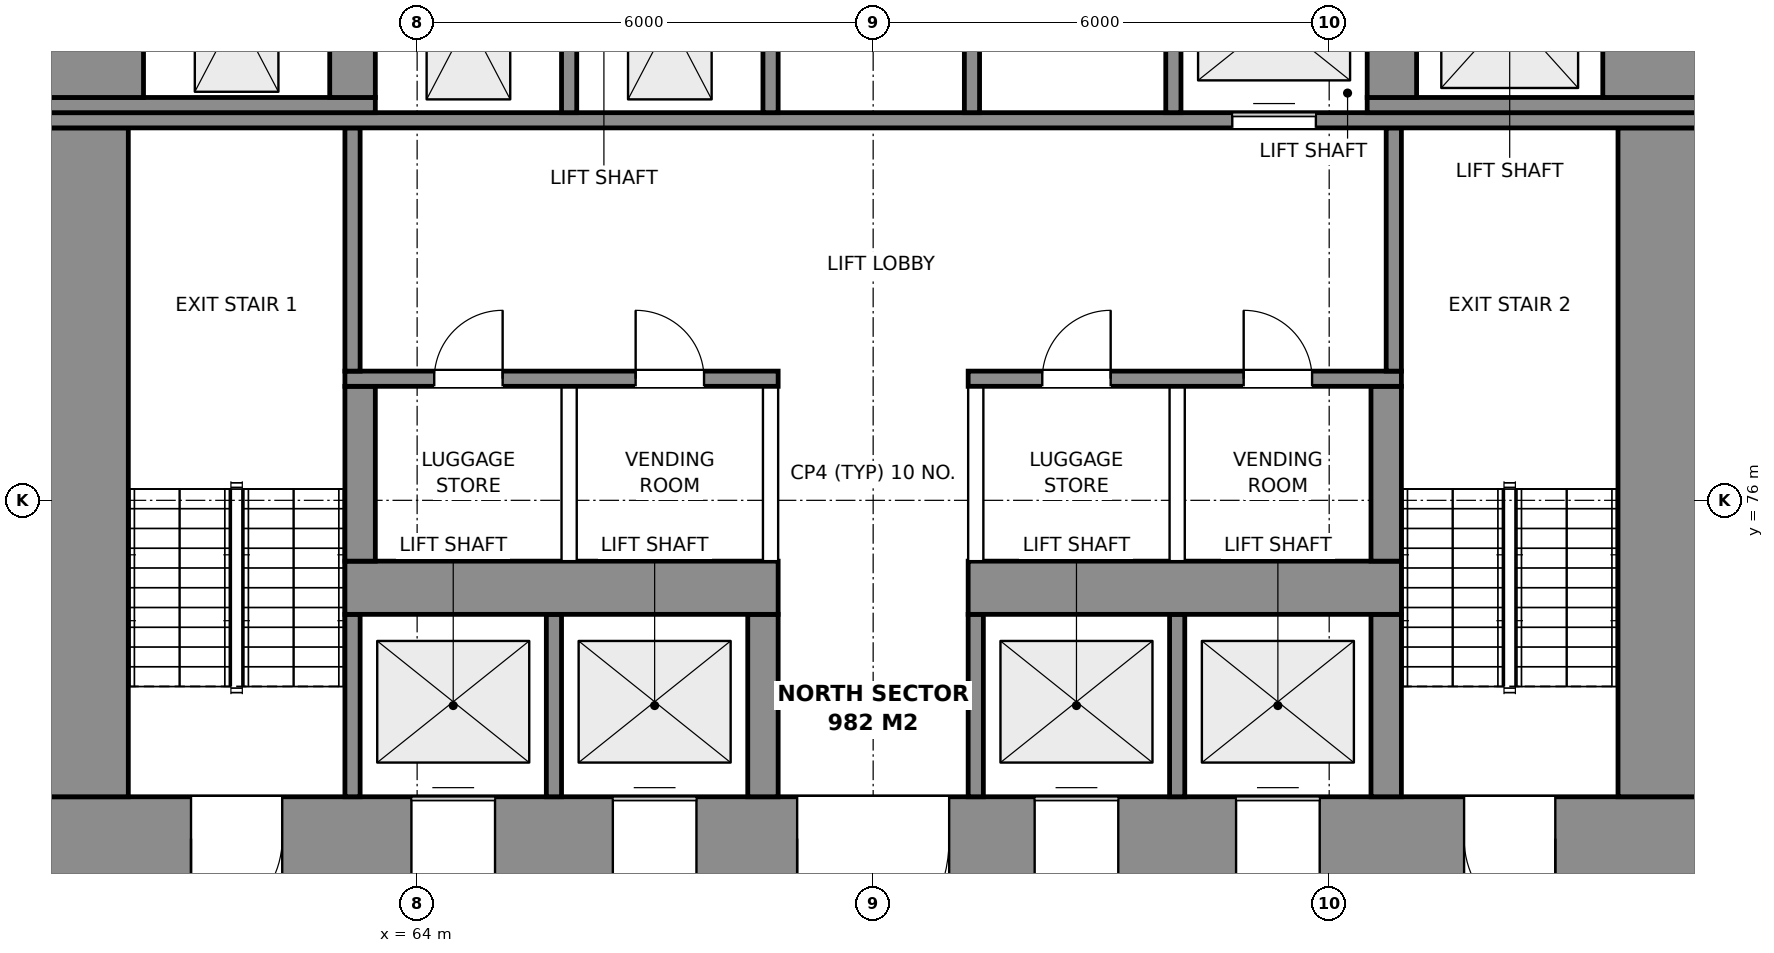
"""IFC4 building model, lengths in metres.
Left out: names, types, materials, properties, quantities, classifications, styles, units other than length and angle.
Written with IfcOpenShell. Run it as: python <this file> out.ifc"""

import sys

from ifc_helpers import new_model, si_unit, direction, frame, frame_2d, origin, place, context, subcontext, project, spatial, rectangle, extrude, element, fill, save


model = new_model("IFC4")
c1 = context("Model", 3, precision=1e-05, world=origin(), true_north=direction((0.0, 1.0)))
c2 = subcontext(c1, "Body", "Model", "MODEL_VIEW")
j1 = project(units=[si_unit("LENGTHUNIT", "METRE"), si_unit("PLANEANGLEUNIT", "RADIAN")], contexts=[c1])
p1 = place(None, origin())
s1 = spatial("IfcSite", under=j1, at=p1, CompositionType="ELEMENT")
p2 = place(p1, origin())
s2 = spatial("IfcBuilding", under=s1, at=p2, CompositionType="ELEMENT")
p3 = place(p2, frame((0.0, 0.0, 98.6)))
s3 = spatial("IfcBuildingStorey", under=s2, at=p3, CompositionType="ELEMENT", Elevation=98.6)
p4 = place(p3, frame((59.0, 71.55, 0.0), z_axis=(0.0, 0.0, 1.0), x_axis=(1.0, 0.0, 0.0)))
e1 = element("IfcWall", 1, at=p4, inside=s3, PredefinedType="SHEAR", context=c2, shape_type="SweptSolid", body=[
    extrude(rectangle(XDim=22.0, YDim=1.1, at=frame_2d((11.0, 0.0))), origin(), (0.0, 0.0, 1.0), 3.9),
])
p5 = place(p4, frame((2.025, 0.0, 0.0)))
e2 = element("IfcOpeningElement", 2, at=p5, cuts=e1, PredefinedType="OPENING", context=c2, shape_type="SweptSolid", body=[
    extrude(rectangle(XDim=1.2, YDim=2.1, at=frame_2d((0.6, 1.05))), frame((0.0, 0.56, 0.0), z_axis=(0.0, -1.0, 0.0), x_axis=(1.0, 0.0, 0.0)), (0.0, 0.0, 1.0), 1.12),
])
p6 = place(p4, frame((18.775, 0.0, 0.0)))
e3 = element("IfcOpeningElement", 3, at=p6, cuts=e1, PredefinedType="OPENING", context=c2, shape_type="SweptSolid", body=[
    extrude(rectangle(XDim=1.2, YDim=2.1, at=frame_2d((0.6, 1.05))), frame((0.0, 0.56, 0.0), z_axis=(0.0, -1.0, 0.0), x_axis=(1.0, 0.0, 0.0)), (0.0, 0.0, 1.0), 1.12),
])
p7 = place(p4, frame((10.0, 0.0, 0.0)))
e4 = element("IfcOpeningElement", 4, at=p7, cuts=e1, PredefinedType="OPENING", context=c2, shape_type="SweptSolid", body=[
    extrude(rectangle(XDim=2.0, YDim=2.1, at=frame_2d((1.0, 1.05))), frame((0.0, 0.56, 0.0), z_axis=(0.0, -1.0, 0.0), x_axis=(1.0, 0.0, 0.0)), (0.0, 0.0, 1.0), 1.12),
])
p8 = place(p4, frame((4.925, 0.0, 0.0)))
e5 = element("IfcOpeningElement", 5, at=p8, cuts=e1, PredefinedType="OPENING", context=c2, shape_type="SweptSolid", body=[
    extrude(rectangle(XDim=1.1, YDim=2.1, at=frame_2d((0.55, 1.05))), frame((0.0, 0.56, 0.0), z_axis=(0.0, -1.0, 0.0), x_axis=(1.0, 0.0, 0.0)), (0.0, 0.0, 1.0), 1.12),
])
p9 = place(p4, frame((7.575, 0.0, 0.0)))
e6 = element("IfcOpeningElement", 6, at=p9, cuts=e1, PredefinedType="OPENING", context=c2, shape_type="SweptSolid", body=[
    extrude(rectangle(XDim=1.1, YDim=2.1, at=frame_2d((0.55, 1.05))), frame((0.0, 0.56, 0.0), z_axis=(0.0, -1.0, 0.0), x_axis=(1.0, 0.0, 0.0)), (0.0, 0.0, 1.0), 1.12),
])
p10 = place(p4, frame((13.125, 0.0, 0.0)))
e7 = element("IfcOpeningElement", 7, at=p10, cuts=e1, PredefinedType="OPENING", context=c2, shape_type="SweptSolid", body=[
    extrude(rectangle(XDim=1.1, YDim=2.1, at=frame_2d((0.55, 1.05))), frame((0.0, 0.56, 0.0), z_axis=(0.0, -1.0, 0.0), x_axis=(1.0, 0.0, 0.0)), (0.0, 0.0, 1.0), 1.12),
])
p11 = place(p4, frame((15.775, 0.0, 0.0)))
e8 = element("IfcOpeningElement", 8, at=p11, cuts=e1, PredefinedType="OPENING", context=c2, shape_type="SweptSolid", body=[
    extrude(rectangle(XDim=1.1, YDim=2.1, at=frame_2d((0.55, 1.05))), frame((0.0, 0.56, 0.0), z_axis=(0.0, -1.0, 0.0), x_axis=(1.0, 0.0, 0.0)), (0.0, 0.0, 1.0), 1.12),
])
p12 = place(p3, frame((59.6, 72.1, 0.0), z_axis=(0.0, 0.0, 1.0), x_axis=(0.0, 1.0, 0.0)))
e9 = element("IfcWall", 9, at=p12, inside=s3, PredefinedType="SHEAR", context=c2, shape_type="SweptSolid", body=[
    extrude(rectangle(XDim=8.8, YDim=1.2, at=frame_2d((4.4, 0.0))), origin(), (0.0, 0.0, 1.0), 3.9),
])
for number, where, z_axis, x_axis in (
    (10, (63.15, 72.1, 0.0), (0.0, 0.0, 1.0), (0.0, 1.0, 0.0)),
    (11, (65.8, 72.1, 0.0), (0.0, 0.0, 1.0), (0.0, 1.0, 0.0)),
):
    element("IfcWall", number, at=place(p3, frame(where, z_axis=z_axis, x_axis=x_axis)), inside=s3, PredefinedType="SHEAR", context=c2, shape_type="SweptSolid", body=[
        extrude(rectangle(XDim=2.4, YDim=0.2, at=frame_2d((1.2, 0.0))), origin(), (0.0, 0.0, 1.0), 3.9),
    ])
p13 = place(p3, frame((68.55, 72.1, 0.0), z_axis=(0.0, 0.0, 1.0), x_axis=(0.0, 1.0, 0.0)))
e12 = element("IfcWall", 12, at=p13, inside=s3, PredefinedType="SHEAR", context=c2, shape_type="SweptSolid", body=[
    extrude(rectangle(XDim=2.4, YDim=0.4, at=frame_2d((1.2, 0.0))), origin(), (0.0, 0.0, 1.0), 3.9),
])
for number, where, z_axis, x_axis in (
    (13, (71.35, 72.1, 0.0), (0.0, 0.0, 1.0), (0.0, 1.0, 0.0)),
    (14, (74.0, 72.1, 0.0), (0.0, 0.0, 1.0), (0.0, 1.0, 0.0)),
):
    element("IfcWall", number, at=place(p3, frame(where, z_axis=z_axis, x_axis=x_axis)), inside=s3, PredefinedType="SHEAR", context=c2, shape_type="SweptSolid", body=[
        extrude(rectangle(XDim=2.4, YDim=0.2, at=frame_2d((1.2, 0.0))), origin(), (0.0, 0.0, 1.0), 3.9),
    ])
p14 = place(p3, frame((76.75, 72.1, 0.0), z_axis=(0.0, 0.0, 1.0), x_axis=(0.0, 1.0, 0.0)))
e15 = element("IfcWall", 15, at=p14, inside=s3, PredefinedType="SHEAR", context=c2, shape_type="SweptSolid", body=[
    extrude(rectangle(XDim=2.4, YDim=0.4, at=frame_2d((1.2, 0.0))), origin(), (0.0, 0.0, 1.0), 3.9),
])
p15 = place(p3, frame((80.4, 72.1, 0.0), z_axis=(0.0, 0.0, 1.0), x_axis=(0.0, 1.0, 0.0)))
e16 = element("IfcWall", 16, at=p15, inside=s3, PredefinedType="SHEAR", context=c2, shape_type="SweptSolid", body=[
    extrude(rectangle(XDim=8.8, YDim=1.2, at=frame_2d((4.4, 0.0))), origin(), (0.0, 0.0, 1.0), 3.9),
])
for number, where, z_axis, x_axis in (
    (17, (63.05, 74.85, 0.0), (0.0, 0.0, 1.0), (1.0, 0.0, 0.0)),
    (18, (71.25, 74.85, 0.0), (0.0, 0.0, 1.0), (1.0, 0.0, 0.0)),
):
    element("IfcWall", number, at=place(p3, frame(where, z_axis=z_axis, x_axis=x_axis)), inside=s3, PredefinedType="SHEAR", context=c2, shape_type="SweptSolid", body=[
        extrude(rectangle(XDim=5.7, YDim=0.7, at=frame_2d((2.85, 0.0))), origin(), (0.0, 0.0, 1.0), 3.9),
    ])
p16 = place(p3, frame((63.25, 75.2, 0.0), z_axis=(0.0, 0.0, 1.0), x_axis=(0.0, 1.0, 0.0)))
e19 = element("IfcWall", 19, at=p16, inside=s3, PredefinedType="SHEAR", context=c2, shape_type="SweptSolid", body=[
    extrude(rectangle(XDim=2.3, YDim=0.4, at=frame_2d((1.15, 0.0))), origin(), (0.0, 0.0, 1.0), 3.9),
])
for number, where, z_axis, x_axis in (
    (20, (66.0, 75.2, 0.0), (0.0, 0.0, 1.0), (0.0, 1.0, 0.0)),
    (21, (68.65, 75.2, 0.0), (0.0, 0.0, 1.0), (0.0, 1.0, 0.0)),
    (22, (71.35, 75.2, 0.0), (0.0, 0.0, 1.0), (0.0, 1.0, 0.0)),
    (23, (74.0, 75.2, 0.0), (0.0, 0.0, 1.0), (0.0, 1.0, 0.0)),
):
    element("IfcWall", number, at=place(p3, frame(where, z_axis=z_axis, x_axis=x_axis)), inside=s3, PredefinedType="PARTITIONING", context=c2, shape_type="SweptSolid", body=[
        extrude(rectangle(XDim=2.3, YDim=0.2, at=frame_2d((1.15, 0.0))), origin(), (0.0, 0.0, 1.0), 3.6),
    ])
p17 = place(p3, frame((76.75, 75.2, 0.0), z_axis=(0.0, 0.0, 1.0), x_axis=(0.0, 1.0, 0.0)))
e24 = element("IfcWall", 24, at=p17, inside=s3, PredefinedType="SHEAR", context=c2, shape_type="SweptSolid", body=[
    extrude(rectangle(XDim=2.3, YDim=0.4, at=frame_2d((1.15, 0.0))), origin(), (0.0, 0.0, 1.0), 3.9),
])
p18 = place(p3, frame((63.05, 77.6, 0.0), z_axis=(0.0, 0.0, 1.0), x_axis=(1.0, 0.0, 0.0)))
e25 = element("IfcWall", 25, at=p18, inside=s3, PredefinedType="SHEAR", context=c2, shape_type="SweptSolid", body=[
    extrude(rectangle(XDim=5.7, YDim=0.2, at=frame_2d((2.85, 0.0))), origin(), (0.0, 0.0, 1.0), 3.9),
])
p19 = place(p18, frame((1.175, 0.0, 0.0)))
e26 = element("IfcOpeningElement", 26, at=p19, cuts=e25, PredefinedType="OPENING", context=c2, shape_type="SweptSolid", body=[
    extrude(rectangle(XDim=0.9, YDim=2.1, at=frame_2d((0.45, 1.05))), frame((0.0, 0.11, 0.0), z_axis=(0.0, -1.0, 0.0), x_axis=(1.0, 0.0, 0.0)), (0.0, 0.0, 1.0), 0.22),
])
p20 = place(p18, frame((3.825, 0.0, 0.0)))
e27 = element("IfcOpeningElement", 27, at=p20, cuts=e25, PredefinedType="OPENING", context=c2, shape_type="SweptSolid", body=[
    extrude(rectangle(XDim=0.9, YDim=2.1, at=frame_2d((0.45, 1.05))), frame((0.0, 0.11, 0.0), z_axis=(0.0, -1.0, 0.0), x_axis=(1.0, 0.0, 0.0)), (0.0, 0.0, 1.0), 0.22),
])
p21 = place(p3, frame((71.25, 77.6, 0.0), z_axis=(0.0, 0.0, 1.0), x_axis=(1.0, 0.0, 0.0)))
e28 = element("IfcWall", 28, at=p21, inside=s3, PredefinedType="SHEAR", context=c2, shape_type="SweptSolid", body=[
    extrude(rectangle(XDim=5.7, YDim=0.2, at=frame_2d((2.85, 0.0))), origin(), (0.0, 0.0, 1.0), 3.9),
])
p22 = place(p21, frame((0.975, 0.0, 0.0)))
e29 = element("IfcOpeningElement", 29, at=p22, cuts=e28, PredefinedType="OPENING", context=c2, shape_type="SweptSolid", body=[
    extrude(rectangle(XDim=0.9, YDim=2.1, at=frame_2d((0.45, 1.05))), frame((0.0, 0.11, 0.0), z_axis=(0.0, -1.0, 0.0), x_axis=(1.0, 0.0, 0.0)), (0.0, 0.0, 1.0), 0.22),
])
p23 = place(p21, frame((3.625, 0.0, 0.0)))
e30 = element("IfcOpeningElement", 30, at=p23, cuts=e28, PredefinedType="OPENING", context=c2, shape_type="SweptSolid", body=[
    extrude(rectangle(XDim=0.9, YDim=2.1, at=frame_2d((0.45, 1.05))), frame((0.0, 0.11, 0.0), z_axis=(0.0, -1.0, 0.0), x_axis=(1.0, 0.0, 0.0)), (0.0, 0.0, 1.0), 0.22),
])
for number, where, z_axis, x_axis in (
    (31, (63.15, 77.7, 0.0), (0.0, 0.0, 1.0), (0.0, 1.0, 0.0)),
    (32, (76.85, 77.7, 0.0), (0.0, 0.0, 1.0), (0.0, 1.0, 0.0)),
):
    element("IfcWall", number, at=place(p3, frame(where, z_axis=z_axis, x_axis=x_axis)), inside=s3, PredefinedType="SHEAR", context=c2, shape_type="SweptSolid", body=[
        extrude(rectangle(XDim=3.2, YDim=0.2, at=frame_2d((1.6, 0.0))), origin(), (0.0, 0.0, 1.0), 3.9),
    ])
p24 = place(p3, frame((59.0, 81.0, 0.0), z_axis=(0.0, 0.0, 1.0), x_axis=(1.0, 0.0, 0.0)))
e33 = element("IfcWall", 33, at=p24, inside=s3, PredefinedType="SHEAR", context=c2, shape_type="SweptSolid", body=[
    extrude(rectangle(XDim=22.0, YDim=0.2, at=frame_2d((11.0, 0.0))), origin(), (0.0, 0.0, 1.0), 3.9),
])
p25 = place(p24, frame((15.725, 0.0, 0.0)))
e34 = element("IfcOpeningElement", 34, at=p25, cuts=e33, PredefinedType="OPENING", context=c2, shape_type="SweptSolid", body=[
    extrude(rectangle(XDim=1.1, YDim=2.1, at=frame_2d((0.55, 1.05))), frame((0.0, 0.11, 0.0), z_axis=(0.0, -1.0, 0.0), x_axis=(1.0, 0.0, 0.0)), (0.0, 0.0, 1.0), 0.22),
])
p26 = place(p3, frame((59.0, 81.2, 0.0), z_axis=(0.0, 0.0, 1.0), x_axis=(1.0, 0.0, 0.0)))
e35 = element("IfcWall", 35, at=p26, inside=s3, PredefinedType="SHEAR", context=c2, shape_type="SweptSolid", body=[
    extrude(rectangle(XDim=4.45, YDim=0.2, at=frame_2d((2.225, 0.0))), origin(), (0.0, 0.0, 1.0), 3.9),
])
for number, where, z_axis, x_axis in (
    (36, (66.0, 81.1, 0.0), (0.0, 0.0, 1.0), (0.0, 1.0, 0.0)),
    (37, (68.65, 81.1, 0.0), (0.0, 0.0, 1.0), (0.0, 1.0, 0.0)),
    (38, (71.3, 81.1, 0.0), (0.0, 0.0, 1.0), (0.0, 1.0, 0.0)),
    (39, (73.95, 81.1, 0.0), (0.0, 0.0, 1.0), (0.0, 1.0, 0.0)),
):
    element("IfcWall", number, at=place(p3, frame(where, z_axis=z_axis, x_axis=x_axis)), inside=s3, PredefinedType="SHEAR", context=c2, shape_type="SweptSolid", body=[
        extrude(rectangle(XDim=2.45, YDim=0.2, at=frame_2d((1.225, 0.0))), origin(), (0.0, 0.0, 1.0), 3.9),
    ])
p27 = place(p3, frame((76.5, 81.2, 0.0), z_axis=(0.0, 0.0, 1.0), x_axis=(1.0, 0.0, 0.0)))
e40 = element("IfcWall", 40, at=p27, inside=s3, PredefinedType="SHEAR", context=c2, shape_type="SweptSolid", body=[
    extrude(rectangle(XDim=4.5, YDim=0.2, at=frame_2d((2.25, 0.0))), origin(), (0.0, 0.0, 1.0), 3.9),
])
p28 = place(p3, frame((59.7, 81.3, 0.0), z_axis=(0.0, 0.0, 1.0), x_axis=(0.0, 1.0, 0.0)))
e41 = element("IfcWall", 41, at=p28, inside=s3, PredefinedType="SHEAR", context=c2, shape_type="SweptSolid", body=[
    extrude(rectangle(XDim=2.25, YDim=1.4, at=frame_2d((1.125, 0.0))), origin(), (0.0, 0.0, 1.0), 3.9),
])
p29 = place(p3, frame((63.15, 81.3, 0.0), z_axis=(0.0, 0.0, 1.0), x_axis=(0.0, 1.0, 0.0)))
e42 = element("IfcWall", 42, at=p29, inside=s3, PredefinedType="SHEAR", context=c2, shape_type="SweptSolid", body=[
    extrude(rectangle(XDim=2.25, YDim=0.6, at=frame_2d((1.125, 0.0))), origin(), (0.0, 0.0, 1.0), 3.9),
])
p30 = place(p3, frame((76.825, 81.3, 0.0), z_axis=(0.0, 0.0, 1.0), x_axis=(0.0, 1.0, 0.0)))
e43 = element("IfcWall", 43, at=p30, inside=s3, PredefinedType="SHEAR", context=c2, shape_type="SweptSolid", body=[
    extrude(rectangle(XDim=2.25, YDim=0.65, at=frame_2d((1.125, 0.0))), origin(), (0.0, 0.0, 1.0), 3.9),
])
p31 = place(p3, frame((80.3, 81.3, 0.0), z_axis=(0.0, 0.0, 1.0), x_axis=(0.0, 1.0, 0.0)))
e44 = element("IfcWall", 44, at=p31, inside=s3, PredefinedType="SHEAR", context=c2, shape_type="SweptSolid", body=[
    extrude(rectangle(XDim=2.25, YDim=1.4, at=frame_2d((1.125, 0.0))), origin(), (0.0, 0.0, 1.0), 3.9),
])
p32 = place(p5, frame((1.2, 0.0, 0.0), z_axis=(0.0, 0.0, 1.0), x_axis=(-1.0, 0.0, 0.0)))
e45 = element("IfcDoor", 45, at=p32, inside=s3, OperationType="SINGLE_SWING_RIGHT", PredefinedType="DOOR", context=c2, shape_type="SweptSolid", body=[
    extrude(rectangle(XDim=1.2, YDim=2.1, at=frame_2d((0.6, 1.05))), frame((0.0, 0.025, 0.0), z_axis=(0.0, -1.0, 0.0), x_axis=(1.0, 0.0, 0.0)), (0.0, 0.0, 1.0), 0.05),
])
fill(e2, e45)
p33 = place(p6, frame((1.2, 0.0, 0.0), z_axis=(0.0, 0.0, 1.0), x_axis=(-1.0, 0.0, 0.0)))
e46 = element("IfcDoor", 46, at=p33, inside=s3, OperationType="SINGLE_SWING_LEFT", PredefinedType="DOOR", context=c2, shape_type="SweptSolid", body=[
    extrude(rectangle(XDim=1.2, YDim=2.1, at=frame_2d((0.6, 1.05))), frame((0.0, 0.025, 0.0), z_axis=(0.0, -1.0, 0.0), x_axis=(1.0, 0.0, 0.0)), (0.0, 0.0, 1.0), 0.05),
])
fill(e3, e46)
p34 = place(p7, frame((2.0, 0.0, 0.0), z_axis=(0.0, 0.0, 1.0), x_axis=(-1.0, 0.0, 0.0)))
e47 = element("IfcDoor", 47, at=p34, inside=s3, OperationType="DOUBLE_DOOR_SINGLE_SWING", PredefinedType="DOOR", context=c2, shape_type="SweptSolid", body=[
    extrude(rectangle(XDim=2.0, YDim=2.1, at=frame_2d((1.0, 1.05))), frame((0.0, 0.025, 0.0), z_axis=(0.0, -1.0, 0.0), x_axis=(1.0, 0.0, 0.0)), (0.0, 0.0, 1.0), 0.05),
])
fill(e4, e47)
p35 = place(p25, origin())
e48 = element("IfcDoor", 48, at=p35, inside=s3, OperationType="DOUBLE_DOOR_SLIDING", PredefinedType="DOOR", context=c2, shape_type="SweptSolid", body=[
    extrude(rectangle(XDim=1.1, YDim=2.1, at=frame_2d((0.55, 1.05))), frame((0.0, 0.025, 0.0), z_axis=(0.0, -1.0, 0.0), x_axis=(1.0, 0.0, 0.0)), (0.0, 0.0, 1.0), 0.05),
])
fill(e34, e48)
p36 = place(p8, origin())
e49 = element("IfcDoor", 49, at=p36, inside=s3, OperationType="DOUBLE_DOOR_SLIDING", PredefinedType="DOOR", context=c2, shape_type="SweptSolid", body=[
    extrude(rectangle(XDim=1.1, YDim=2.1, at=frame_2d((0.55, 1.05))), frame((0.0, 0.025, 0.0), z_axis=(0.0, -1.0, 0.0), x_axis=(1.0, 0.0, 0.0)), (0.0, 0.0, 1.0), 0.05),
])
fill(e5, e49)
p37 = place(p9, origin())
e50 = element("IfcDoor", 50, at=p37, inside=s3, OperationType="DOUBLE_DOOR_SLIDING", PredefinedType="DOOR", context=c2, shape_type="SweptSolid", body=[
    extrude(rectangle(XDim=1.1, YDim=2.1, at=frame_2d((0.55, 1.05))), frame((0.0, 0.025, 0.0), z_axis=(0.0, -1.0, 0.0), x_axis=(1.0, 0.0, 0.0)), (0.0, 0.0, 1.0), 0.05),
])
fill(e6, e50)
p38 = place(p10, origin())
e51 = element("IfcDoor", 51, at=p38, inside=s3, OperationType="DOUBLE_DOOR_SLIDING", PredefinedType="DOOR", context=c2, shape_type="SweptSolid", body=[
    extrude(rectangle(XDim=1.1, YDim=2.1, at=frame_2d((0.55, 1.05))), frame((0.0, 0.025, 0.0), z_axis=(0.0, -1.0, 0.0), x_axis=(1.0, 0.0, 0.0)), (0.0, 0.0, 1.0), 0.05),
])
fill(e7, e51)
p39 = place(p11, origin())
e52 = element("IfcDoor", 52, at=p39, inside=s3, OperationType="DOUBLE_DOOR_SLIDING", PredefinedType="DOOR", context=c2, shape_type="SweptSolid", body=[
    extrude(rectangle(XDim=1.1, YDim=2.1, at=frame_2d((0.55, 1.05))), frame((0.0, 0.025, 0.0), z_axis=(0.0, -1.0, 0.0), x_axis=(1.0, 0.0, 0.0)), (0.0, 0.0, 1.0), 0.05),
])
fill(e8, e52)
p40 = place(p19, origin())
e53 = element("IfcDoor", 53, at=p40, inside=s3, OperationType="SINGLE_SWING_RIGHT", PredefinedType="DOOR", context=c2, shape_type="SweptSolid", body=[
    extrude(rectangle(XDim=0.9, YDim=2.1, at=frame_2d((0.45, 1.05))), frame((0.0, 0.025, 0.0), z_axis=(0.0, -1.0, 0.0), x_axis=(1.0, 0.0, 0.0)), (0.0, 0.0, 1.0), 0.05),
])
fill(e26, e53)
p41 = place(p20, origin())
e54 = element("IfcDoor", 54, at=p41, inside=s3, OperationType="SINGLE_SWING_LEFT", PredefinedType="DOOR", context=c2, shape_type="SweptSolid", body=[
    extrude(rectangle(XDim=0.9, YDim=2.1, at=frame_2d((0.45, 1.05))), frame((0.0, 0.025, 0.0), z_axis=(0.0, -1.0, 0.0), x_axis=(1.0, 0.0, 0.0)), (0.0, 0.0, 1.0), 0.05),
])
fill(e27, e54)
p42 = place(p22, origin())
e55 = element("IfcDoor", 55, at=p42, inside=s3, OperationType="SINGLE_SWING_RIGHT", PredefinedType="DOOR", context=c2, shape_type="SweptSolid", body=[
    extrude(rectangle(XDim=0.9, YDim=2.1, at=frame_2d((0.45, 1.05))), frame((0.0, 0.025, 0.0), z_axis=(0.0, -1.0, 0.0), x_axis=(1.0, 0.0, 0.0)), (0.0, 0.0, 1.0), 0.05),
])
fill(e29, e55)
p43 = place(p23, origin())
e56 = element("IfcDoor", 56, at=p43, inside=s3, OperationType="SINGLE_SWING_LEFT", PredefinedType="DOOR", context=c2, shape_type="SweptSolid", body=[
    extrude(rectangle(XDim=0.9, YDim=2.1, at=frame_2d((0.45, 1.05))), frame((0.0, 0.025, 0.0), z_axis=(0.0, -1.0, 0.0), x_axis=(1.0, 0.0, 0.0)), (0.0, 0.0, 1.0), 0.05),
])
fill(e30, e56)
save(model, sys.argv[1])
